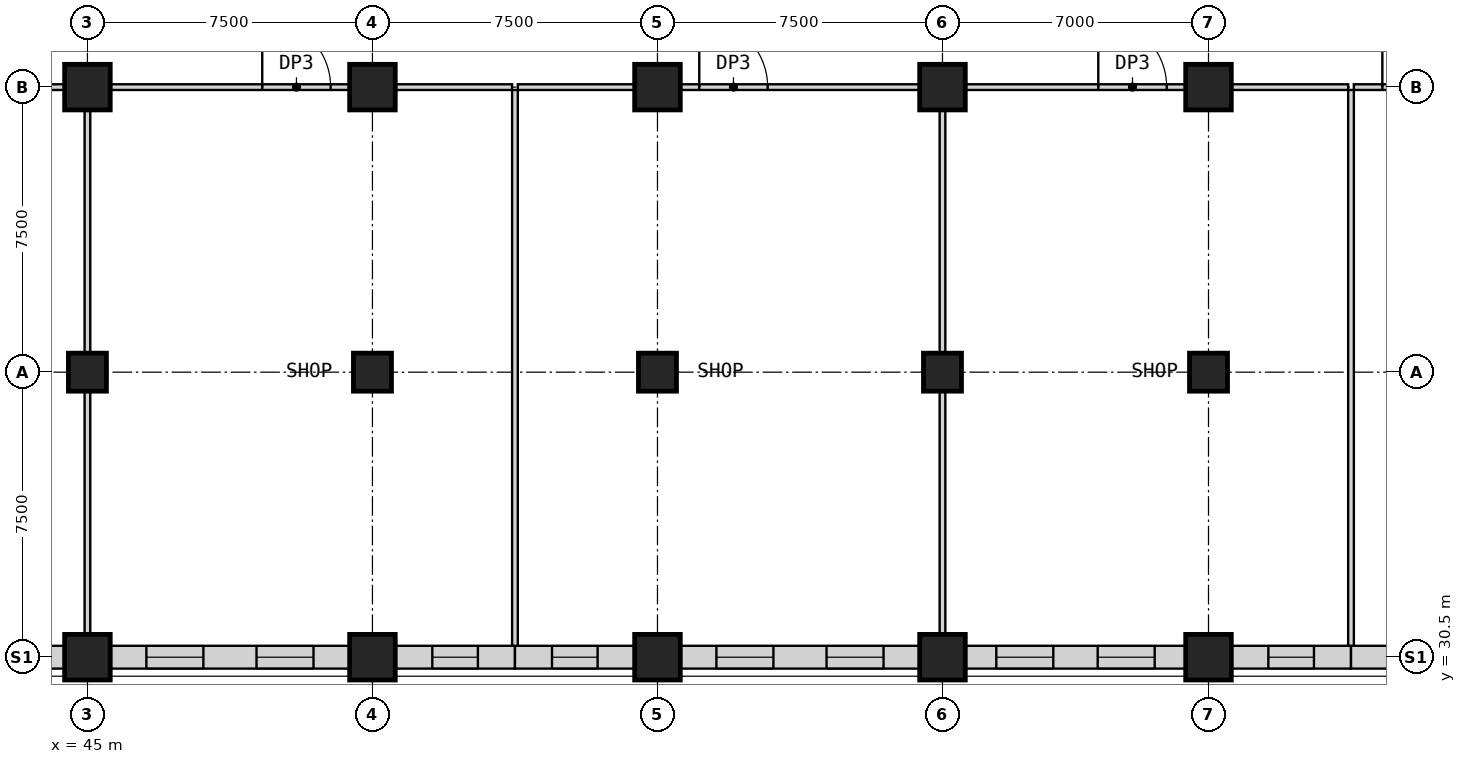
"""IFC4 building model, lengths in metres.
Left out: names, types, materials, properties, quantities, classifications, styles, units other than length and angle.
Written with IfcOpenShell. Run it as: python <this file> out.ifc"""

import sys

from ifc_helpers import new_model, si_unit, direction, frame, frame_2d, origin, origin_2d, place, context, subcontext, project, spatial, rectangle, extrude, element, fill, save


model = new_model("IFC4")
c1 = context("Model", 3, precision=1e-05, world=origin(), true_north=direction((0.0, 1.0)))
c2 = subcontext(c1, "Body", "Model", "MODEL_VIEW")
j1 = project(units=[si_unit("LENGTHUNIT", "METRE"), si_unit("PLANEANGLEUNIT", "RADIAN")], contexts=[c1])
p1 = place(None, origin())
s1 = spatial("IfcSite", under=j1, at=p1, CompositionType="ELEMENT")
p2 = place(p1, origin())
s2 = spatial("IfcBuilding", under=s1, at=p2, CompositionType="ELEMENT")
p3 = place(p2, frame((0.0, 0.0, 13.5)))
s3 = spatial("IfcBuildingStorey", under=s2, at=p3, CompositionType="ELEMENT", Elevation=13.5)
p4 = place(p3, frame((45.0, 38.0, 0.0), z_axis=(0.0, 0.0, 1.0), x_axis=(1.0, 0.0, 0.0)))
e1 = element("IfcColumn", 1, at=p4, inside=s3, PredefinedType="COLUMN", context=c2, shape_type="SweptSolid", body=[
    extrude(rectangle(XDim=1.0, YDim=1.0, at=origin_2d()), origin(), (0.0, 0.0, 1.0), 5.0),
])
p5 = place(p3, frame((45.0, 45.5, 0.0), z_axis=(0.0, 0.0, 1.0), x_axis=(1.0, 0.0, 0.0)))
e2 = element("IfcColumn", 2, at=p5, inside=s3, PredefinedType="COLUMN", context=c2, shape_type="SweptSolid", body=[
    extrude(rectangle(XDim=1.2, YDim=1.2, at=origin_2d()), origin(), (0.0, 0.0, 1.0), 5.0),
])
p6 = place(p3, frame((52.5, 38.0, 0.0), z_axis=(0.0, 0.0, 1.0), x_axis=(1.0, 0.0, 0.0)))
e3 = element("IfcColumn", 3, at=p6, inside=s3, PredefinedType="COLUMN", context=c2, shape_type="SweptSolid", body=[
    extrude(rectangle(XDim=1.0, YDim=1.0, at=origin_2d()), origin(), (0.0, 0.0, 1.0), 5.0),
])
p7 = place(p3, frame((52.5, 45.5, 0.0), z_axis=(0.0, 0.0, 1.0), x_axis=(1.0, 0.0, 0.0)))
e4 = element("IfcColumn", 4, at=p7, inside=s3, PredefinedType="COLUMN", context=c2, shape_type="SweptSolid", body=[
    extrude(rectangle(XDim=1.2, YDim=1.2, at=origin_2d()), origin(), (0.0, 0.0, 1.0), 5.0),
])
p8 = place(p3, frame((60.0, 38.0, 0.0), z_axis=(0.0, 0.0, 1.0), x_axis=(1.0, 0.0, 0.0)))
e5 = element("IfcColumn", 5, at=p8, inside=s3, PredefinedType="COLUMN", context=c2, shape_type="SweptSolid", body=[
    extrude(rectangle(XDim=1.0, YDim=1.0, at=origin_2d()), origin(), (0.0, 0.0, 1.0), 5.0),
])
p9 = place(p3, frame((60.0, 45.5, 0.0), z_axis=(0.0, 0.0, 1.0), x_axis=(1.0, 0.0, 0.0)))
e6 = element("IfcColumn", 6, at=p9, inside=s3, PredefinedType="COLUMN", context=c2, shape_type="SweptSolid", body=[
    extrude(rectangle(XDim=1.2, YDim=1.2, at=origin_2d()), origin(), (0.0, 0.0, 1.0), 5.0),
])
p10 = place(p3, frame((67.5, 38.0, 0.0), z_axis=(0.0, 0.0, 1.0), x_axis=(1.0, 0.0, 0.0)))
e7 = element("IfcColumn", 7, at=p10, inside=s3, PredefinedType="COLUMN", context=c2, shape_type="SweptSolid", body=[
    extrude(rectangle(XDim=1.0, YDim=1.0, at=origin_2d()), origin(), (0.0, 0.0, 1.0), 5.0),
])
p11 = place(p3, frame((67.5, 45.5, 0.0), z_axis=(0.0, 0.0, 1.0), x_axis=(1.0, 0.0, 0.0)))
e8 = element("IfcColumn", 8, at=p11, inside=s3, PredefinedType="COLUMN", context=c2, shape_type="SweptSolid", body=[
    extrude(rectangle(XDim=1.2, YDim=1.2, at=origin_2d()), origin(), (0.0, 0.0, 1.0), 5.0),
])
p12 = place(p3, frame((74.5, 38.0, 0.0), z_axis=(0.0, 0.0, 1.0), x_axis=(1.0, 0.0, 0.0)))
e9 = element("IfcColumn", 9, at=p12, inside=s3, PredefinedType="COLUMN", context=c2, shape_type="SweptSolid", body=[
    extrude(rectangle(XDim=1.0, YDim=1.0, at=origin_2d()), origin(), (0.0, 0.0, 1.0), 5.0),
])
for number, where, z_axis, x_axis in (
    (10, (74.5, 45.5, 0.0), (0.0, 0.0, 1.0), (1.0, 0.0, 0.0)),
    (11, (45.0, 30.5, 0.0), (0.0, 0.0, 1.0), (1.0, 0.0, 0.0)),
    (12, (52.5, 30.5, 0.0), (0.0, 0.0, 1.0), (1.0, 0.0, 0.0)),
    (13, (60.0, 30.5, 0.0), (0.0, 0.0, 1.0), (1.0, 0.0, 0.0)),
    (14, (67.5, 30.5, 0.0), (0.0, 0.0, 1.0), (1.0, 0.0, 0.0)),
    (15, (74.5, 30.5, 0.0), (0.0, 0.0, 1.0), (1.0, 0.0, 0.0)),
):
    element("IfcColumn", number, at=place(p3, frame(where, z_axis=z_axis, x_axis=x_axis)), inside=s3, PredefinedType="COLUMN", context=c2, shape_type="SweptSolid", body=[
        extrude(rectangle(XDim=1.2, YDim=1.2, at=origin_2d()), origin(), (0.0, 0.0, 1.0), 5.0),
    ])
p13 = place(p3, frame((38.1, 30.5, 0.0), z_axis=(0.0, 0.0, 1.0), x_axis=(1.0, 0.0, 0.0)))
e16 = element("IfcWall", 16, at=p13, inside=s3, PredefinedType="PARTITIONING", context=c2, shape_type="SweptSolid", body=[
    extrude(rectangle(XDim=6.3, YDim=0.6, at=frame_2d((3.15, 0.0))), origin(), (0.0, 0.0, 1.0), 4.1),
])
p14 = place(p13, frame((0.951, 0.0, 0.9)))
e17 = element("IfcOpeningElement", 17, at=p14, cuts=e16, PredefinedType="OPENING", context=c2, shape_type="SweptSolid", body=[
    extrude(rectangle(XDim=1.5, YDim=2.8, at=frame_2d((0.75, 1.4))), frame((0.0, 0.31, 0.0), z_axis=(0.0, -1.0, 0.0), x_axis=(1.0, 0.0, 0.0)), (0.0, 0.0, 1.0), 0.62),
])
p15 = place(p13, frame((3.849, 0.0, 0.9)))
e18 = element("IfcOpeningElement", 18, at=p15, cuts=e16, PredefinedType="OPENING", context=c2, shape_type="SweptSolid", body=[
    extrude(rectangle(XDim=1.5, YDim=2.8, at=frame_2d((0.75, 1.4))), frame((0.0, 0.31, 0.0), z_axis=(0.0, -1.0, 0.0), x_axis=(1.0, 0.0, 0.0)), (0.0, 0.0, 1.0), 0.62),
])
p16 = place(p3, frame((45.6, 30.5, 0.0), z_axis=(0.0, 0.0, 1.0), x_axis=(1.0, 0.0, 0.0)))
e19 = element("IfcWall", 19, at=p16, inside=s3, PredefinedType="PARTITIONING", context=c2, shape_type="SweptSolid", body=[
    extrude(rectangle(XDim=6.3, YDim=0.6, at=frame_2d((3.15, 0.0))), origin(), (0.0, 0.0, 1.0), 4.1),
])
p17 = place(p16, frame((0.951, 0.0, 0.9)))
e20 = element("IfcOpeningElement", 20, at=p17, cuts=e19, PredefinedType="OPENING", context=c2, shape_type="SweptSolid", body=[
    extrude(rectangle(XDim=1.5, YDim=2.8, at=frame_2d((0.75, 1.4))), frame((0.0, 0.31, 0.0), z_axis=(0.0, -1.0, 0.0), x_axis=(1.0, 0.0, 0.0)), (0.0, 0.0, 1.0), 0.62),
])
p18 = place(p16, frame((3.849, 0.0, 0.9)))
e21 = element("IfcOpeningElement", 21, at=p18, cuts=e19, PredefinedType="OPENING", context=c2, shape_type="SweptSolid", body=[
    extrude(rectangle(XDim=1.5, YDim=2.8, at=frame_2d((0.75, 1.4))), frame((0.0, 0.31, 0.0), z_axis=(0.0, -1.0, 0.0), x_axis=(1.0, 0.0, 0.0)), (0.0, 0.0, 1.0), 0.62),
])
p19 = place(p3, frame((53.1, 30.5, 0.0), z_axis=(0.0, 0.0, 1.0), x_axis=(1.0, 0.0, 0.0)))
e22 = element("IfcWall", 22, at=p19, inside=s3, PredefinedType="PARTITIONING", context=c2, shape_type="SweptSolid", body=[
    extrude(rectangle(XDim=3.15, YDim=0.6, at=frame_2d((1.575, 0.0))), origin(), (0.0, 0.0, 1.0), 4.1),
])
p20 = place(p19, frame((0.975, 0.0, 0.9)))
e23 = element("IfcOpeningElement", 23, at=p20, cuts=e22, PredefinedType="OPENING", context=c2, shape_type="SweptSolid", body=[
    extrude(rectangle(XDim=1.2, YDim=2.8, at=frame_2d((0.6, 1.4))), frame((0.0, 0.31, 0.0), z_axis=(0.0, -1.0, 0.0), x_axis=(1.0, 0.0, 0.0)), (0.0, 0.0, 1.0), 0.62),
])
p21 = place(p3, frame((56.25, 30.5, 0.0), z_axis=(0.0, 0.0, 1.0), x_axis=(1.0, 0.0, 0.0)))
e24 = element("IfcWall", 24, at=p21, inside=s3, PredefinedType="PARTITIONING", context=c2, shape_type="SweptSolid", body=[
    extrude(rectangle(XDim=3.15, YDim=0.6, at=frame_2d((1.575, 0.0))), origin(), (0.0, 0.0, 1.0), 4.1),
])
p22 = place(p21, frame((0.975, 0.0, 0.9)))
e25 = element("IfcOpeningElement", 25, at=p22, cuts=e24, PredefinedType="OPENING", context=c2, shape_type="SweptSolid", body=[
    extrude(rectangle(XDim=1.2, YDim=2.8, at=frame_2d((0.6, 1.4))), frame((0.0, 0.31, 0.0), z_axis=(0.0, -1.0, 0.0), x_axis=(1.0, 0.0, 0.0)), (0.0, 0.0, 1.0), 0.62),
])
p23 = place(p3, frame((60.6, 30.5, 0.0), z_axis=(0.0, 0.0, 1.0), x_axis=(1.0, 0.0, 0.0)))
e26 = element("IfcWall", 26, at=p23, inside=s3, PredefinedType="PARTITIONING", context=c2, shape_type="SweptSolid", body=[
    extrude(rectangle(XDim=6.3, YDim=0.6, at=frame_2d((3.15, 0.0))), origin(), (0.0, 0.0, 1.0), 4.1),
])
p24 = place(p23, frame((0.951, 0.0, 0.9)))
e27 = element("IfcOpeningElement", 27, at=p24, cuts=e26, PredefinedType="OPENING", context=c2, shape_type="SweptSolid", body=[
    extrude(rectangle(XDim=1.5, YDim=2.8, at=frame_2d((0.75, 1.4))), frame((0.0, 0.31, 0.0), z_axis=(0.0, -1.0, 0.0), x_axis=(1.0, 0.0, 0.0)), (0.0, 0.0, 1.0), 0.62),
])
p25 = place(p23, frame((3.849, 0.0, 0.9)))
e28 = element("IfcOpeningElement", 28, at=p25, cuts=e26, PredefinedType="OPENING", context=c2, shape_type="SweptSolid", body=[
    extrude(rectangle(XDim=1.5, YDim=2.8, at=frame_2d((0.75, 1.4))), frame((0.0, 0.31, 0.0), z_axis=(0.0, -1.0, 0.0), x_axis=(1.0, 0.0, 0.0)), (0.0, 0.0, 1.0), 0.62),
])
p26 = place(p3, frame((68.1, 30.5, 0.0), z_axis=(0.0, 0.0, 1.0), x_axis=(1.0, 0.0, 0.0)))
e29 = element("IfcWall", 29, at=p26, inside=s3, PredefinedType="PARTITIONING", context=c2, shape_type="SweptSolid", body=[
    extrude(rectangle(XDim=5.8, YDim=0.6, at=frame_2d((2.9, 0.0))), origin(), (0.0, 0.0, 1.0), 4.1),
])
p27 = place(p26, frame((0.816, 0.0, 0.9)))
e30 = element("IfcOpeningElement", 30, at=p27, cuts=e29, PredefinedType="OPENING", context=c2, shape_type="SweptSolid", body=[
    extrude(rectangle(XDim=1.5, YDim=2.8, at=frame_2d((0.75, 1.4))), frame((0.0, 0.31, 0.0), z_axis=(0.0, -1.0, 0.0), x_axis=(1.0, 0.0, 0.0)), (0.0, 0.0, 1.0), 0.62),
])
p28 = place(p26, frame((3.484, 0.0, 0.9)))
e31 = element("IfcOpeningElement", 31, at=p28, cuts=e29, PredefinedType="OPENING", context=c2, shape_type="SweptSolid", body=[
    extrude(rectangle(XDim=1.5, YDim=2.8, at=frame_2d((0.75, 1.4))), frame((0.0, 0.31, 0.0), z_axis=(0.0, -1.0, 0.0), x_axis=(1.0, 0.0, 0.0)), (0.0, 0.0, 1.0), 0.62),
])
p29 = place(p3, frame((75.1, 30.5, 0.0), z_axis=(0.0, 0.0, 1.0), x_axis=(1.0, 0.0, 0.0)))
e32 = element("IfcWall", 32, at=p29, inside=s3, PredefinedType="PARTITIONING", context=c2, shape_type="SweptSolid", body=[
    extrude(rectangle(XDim=3.15, YDim=0.6, at=frame_2d((1.575, 0.0))), origin(), (0.0, 0.0, 1.0), 4.1),
])
p30 = place(p29, frame((0.975, 0.0, 0.9)))
e33 = element("IfcOpeningElement", 33, at=p30, cuts=e32, PredefinedType="OPENING", context=c2, shape_type="SweptSolid", body=[
    extrude(rectangle(XDim=1.2, YDim=2.8, at=frame_2d((0.6, 1.4))), frame((0.0, 0.31, 0.0), z_axis=(0.0, -1.0, 0.0), x_axis=(1.0, 0.0, 0.0)), (0.0, 0.0, 1.0), 0.62),
])
p31 = place(p3, frame((78.25, 30.5, 0.0), z_axis=(0.0, 0.0, 1.0), x_axis=(1.0, 0.0, 0.0)))
e34 = element("IfcWall", 34, at=p31, inside=s3, PredefinedType="PARTITIONING", context=c2, shape_type="SweptSolid", body=[
    extrude(rectangle(XDim=3.15, YDim=0.6, at=frame_2d((1.575, 0.0))), origin(), (0.0, 0.0, 1.0), 4.1),
])
p32 = place(p31, frame((0.975, 0.0, 0.9)))
e35 = element("IfcOpeningElement", 35, at=p32, cuts=e34, PredefinedType="OPENING", context=c2, shape_type="SweptSolid", body=[
    extrude(rectangle(XDim=1.2, YDim=2.8, at=frame_2d((0.6, 1.4))), frame((0.0, 0.31, 0.0), z_axis=(0.0, -1.0, 0.0), x_axis=(1.0, 0.0, 0.0)), (0.0, 0.0, 1.0), 0.62),
])
p33 = place(p3, frame((38.1, 45.5, 0.0), z_axis=(0.0, 0.0, 1.0), x_axis=(1.0, 0.0, 0.0)))
e36 = element("IfcWall", 36, at=p33, inside=s3, PredefinedType="PARTITIONING", context=c2, shape_type="SweptSolid", body=[
    extrude(rectangle(XDim=6.3, YDim=0.15, at=frame_2d((3.15, 0.0))), origin(), (0.0, 0.0, 1.0), 4.7),
])
p34 = place(p33, frame((0.5, 0.0, 0.0)))
e37 = element("IfcOpeningElement", 37, at=p34, cuts=e36, PredefinedType="OPENING", context=c2, shape_type="SweptSolid", body=[
    extrude(rectangle(XDim=1.8, YDim=2.4, at=frame_2d((0.9, 1.2))), frame((0.0, 0.085, 0.0), z_axis=(0.0, -1.0, 0.0), x_axis=(1.0, 0.0, 0.0)), (0.0, 0.0, 1.0), 0.17),
])
p35 = place(p3, frame((45.6, 45.5, 0.0), z_axis=(0.0, 0.0, 1.0), x_axis=(1.0, 0.0, 0.0)))
e38 = element("IfcWall", 38, at=p35, inside=s3, PredefinedType="PARTITIONING", context=c2, shape_type="SweptSolid", body=[
    extrude(rectangle(XDim=6.3, YDim=0.15, at=frame_2d((3.15, 0.0))), origin(), (0.0, 0.0, 1.0), 4.7),
])
p36 = place(p35, frame((4.0, 0.0, 0.0)))
e39 = element("IfcOpeningElement", 39, at=p36, cuts=e38, PredefinedType="OPENING", context=c2, shape_type="SweptSolid", body=[
    extrude(rectangle(XDim=1.8, YDim=2.4, at=frame_2d((0.9, 1.2))), frame((0.0, 0.085, 0.0), z_axis=(0.0, -1.0, 0.0), x_axis=(1.0, 0.0, 0.0)), (0.0, 0.0, 1.0), 0.17),
])
for number, where, z_axis, x_axis in (
    (40, (53.1, 45.5, 0.0), (0.0, 0.0, 1.0), (1.0, 0.0, 0.0)),
    (41, (56.325, 45.5, 0.0), (0.0, 0.0, 1.0), (1.0, 0.0, 0.0)),
):
    element("IfcWall", number, at=place(p3, frame(where, z_axis=z_axis, x_axis=x_axis)), inside=s3, PredefinedType="PARTITIONING", context=c2, shape_type="SweptSolid", body=[
        extrude(rectangle(XDim=3.075, YDim=0.15, at=frame_2d((1.538, 0.0))), origin(), (0.0, 0.0, 1.0), 4.7),
    ])
p37 = place(p3, frame((60.6, 45.5, 0.0), z_axis=(0.0, 0.0, 1.0), x_axis=(1.0, 0.0, 0.0)))
e42 = element("IfcWall", 42, at=p37, inside=s3, PredefinedType="PARTITIONING", context=c2, shape_type="SweptSolid", body=[
    extrude(rectangle(XDim=6.3, YDim=0.15, at=frame_2d((3.15, 0.0))), origin(), (0.0, 0.0, 1.0), 4.7),
])
p38 = place(p37, frame((0.5, 0.0, 0.0)))
e43 = element("IfcOpeningElement", 43, at=p38, cuts=e42, PredefinedType="OPENING", context=c2, shape_type="SweptSolid", body=[
    extrude(rectangle(XDim=1.8, YDim=2.4, at=frame_2d((0.9, 1.2))), frame((0.0, 0.085, 0.0), z_axis=(0.0, -1.0, 0.0), x_axis=(1.0, 0.0, 0.0)), (0.0, 0.0, 1.0), 0.17),
])
p39 = place(p3, frame((68.1, 45.5, 0.0), z_axis=(0.0, 0.0, 1.0), x_axis=(1.0, 0.0, 0.0)))
e44 = element("IfcWall", 44, at=p39, inside=s3, PredefinedType="PARTITIONING", context=c2, shape_type="SweptSolid", body=[
    extrude(rectangle(XDim=5.8, YDim=0.15, at=frame_2d((2.9, 0.0))), origin(), (0.0, 0.0, 1.0), 4.7),
])
p40 = place(p39, frame((3.5, 0.0, 0.0)))
e45 = element("IfcOpeningElement", 45, at=p40, cuts=e44, PredefinedType="OPENING", context=c2, shape_type="SweptSolid", body=[
    extrude(rectangle(XDim=1.8, YDim=2.4, at=frame_2d((0.9, 1.2))), frame((0.0, 0.085, 0.0), z_axis=(0.0, -1.0, 0.0), x_axis=(1.0, 0.0, 0.0)), (0.0, 0.0, 1.0), 0.17),
])
p41 = place(p3, frame((75.1, 45.5, 0.0), z_axis=(0.0, 0.0, 1.0), x_axis=(1.0, 0.0, 0.0)))
e46 = element("IfcWall", 46, at=p41, inside=s3, PredefinedType="PARTITIONING", context=c2, shape_type="SweptSolid", body=[
    extrude(rectangle(XDim=3.075, YDim=0.15, at=frame_2d((1.538, 0.0))), origin(), (0.0, 0.0, 1.0), 4.7),
])
p42 = place(p3, frame((78.325, 45.5, 0.0), z_axis=(0.0, 0.0, 1.0), x_axis=(1.0, 0.0, 0.0)))
e47 = element("IfcWall", 47, at=p42, inside=s3, PredefinedType="PARTITIONING", context=c2, shape_type="SweptSolid", body=[
    extrude(rectangle(XDim=3.075, YDim=0.15, at=frame_2d((1.538, 0.0))), origin(), (0.0, 0.0, 1.0), 4.7),
])
p43 = place(p42, frame((0.75, 0.0, 0.0)))
e48 = element("IfcOpeningElement", 48, at=p43, cuts=e47, PredefinedType="OPENING", context=c2, shape_type="SweptSolid", body=[
    extrude(rectangle(XDim=1.8, YDim=2.4, at=frame_2d((0.9, 1.2))), frame((0.0, 0.085, 0.0), z_axis=(0.0, -1.0, 0.0), x_axis=(1.0, 0.0, 0.0)), (0.0, 0.0, 1.0), 0.17),
])
for number, where, z_axis, x_axis in (
    (49, (45.0, 31.1, 0.0), (0.0, 0.0, 1.0), (0.0, 1.0, 0.0)),
    (50, (45.0, 38.5, 0.0), (0.0, 0.0, 1.0), (0.0, 1.0, 0.0)),
):
    element("IfcWall", number, at=place(p3, frame(where, z_axis=z_axis, x_axis=x_axis)), inside=s3, PredefinedType="PARTITIONING", context=c2, shape_type="SweptSolid", body=[
        extrude(rectangle(XDim=6.4, YDim=0.15, at=frame_2d((3.2, 0.0))), origin(), (0.0, 0.0, 1.0), 4.7),
    ])
p44 = place(p3, frame((56.25, 30.8, 0.0), z_axis=(0.0, 0.0, 1.0), x_axis=(0.0, 1.0, 0.0)))
e51 = element("IfcWall", 51, at=p44, inside=s3, PredefinedType="PARTITIONING", context=c2, shape_type="SweptSolid", body=[
    extrude(rectangle(XDim=14.625, YDim=0.15, at=frame_2d((7.312, 0.0))), origin(), (0.0, 0.0, 1.0), 4.7),
])
for number, where, z_axis, x_axis in (
    (52, (67.5, 31.1, 0.0), (0.0, 0.0, 1.0), (0.0, 1.0, 0.0)),
    (53, (67.5, 38.5, 0.0), (0.0, 0.0, 1.0), (0.0, 1.0, 0.0)),
):
    element("IfcWall", number, at=place(p3, frame(where, z_axis=z_axis, x_axis=x_axis)), inside=s3, PredefinedType="PARTITIONING", context=c2, shape_type="SweptSolid", body=[
        extrude(rectangle(XDim=6.4, YDim=0.15, at=frame_2d((3.2, 0.0))), origin(), (0.0, 0.0, 1.0), 4.7),
    ])
p45 = place(p3, frame((78.25, 30.8, 0.0), z_axis=(0.0, 0.0, 1.0), x_axis=(0.0, 1.0, 0.0)))
e54 = element("IfcWall", 54, at=p45, inside=s3, PredefinedType="PARTITIONING", context=c2, shape_type="SweptSolid", body=[
    extrude(rectangle(XDim=14.625, YDim=0.15, at=frame_2d((7.312, 0.0))), origin(), (0.0, 0.0, 1.0), 4.7),
])
p46 = place(p17, origin())
e55 = element("IfcWindow", 55, at=p46, inside=s3, PartitioningType="SINGLE_PANEL", PredefinedType="WINDOW", context=c2, shape_type="SweptSolid", body=[
    extrude(rectangle(XDim=1.5, YDim=2.8, at=frame_2d((0.75, 1.4))), frame((0.0, 0.03, 0.0), z_axis=(0.0, -1.0, 0.0), x_axis=(1.0, 0.0, 0.0)), (0.0, 0.0, 1.0), 0.06),
])
fill(e20, e55)
p47 = place(p18, origin())
e56 = element("IfcWindow", 56, at=p47, inside=s3, PartitioningType="SINGLE_PANEL", PredefinedType="WINDOW", context=c2, shape_type="SweptSolid", body=[
    extrude(rectangle(XDim=1.5, YDim=2.8, at=frame_2d((0.75, 1.4))), frame((0.0, 0.03, 0.0), z_axis=(0.0, -1.0, 0.0), x_axis=(1.0, 0.0, 0.0)), (0.0, 0.0, 1.0), 0.06),
])
fill(e21, e56)
p48 = place(p20, origin())
e57 = element("IfcWindow", 57, at=p48, inside=s3, PartitioningType="SINGLE_PANEL", PredefinedType="WINDOW", context=c2, shape_type="SweptSolid", body=[
    extrude(rectangle(XDim=1.2, YDim=2.8, at=frame_2d((0.6, 1.4))), frame((0.0, 0.03, 0.0), z_axis=(0.0, -1.0, 0.0), x_axis=(1.0, 0.0, 0.0)), (0.0, 0.0, 1.0), 0.06),
])
fill(e23, e57)
p49 = place(p22, origin())
e58 = element("IfcWindow", 58, at=p49, inside=s3, PartitioningType="SINGLE_PANEL", PredefinedType="WINDOW", context=c2, shape_type="SweptSolid", body=[
    extrude(rectangle(XDim=1.2, YDim=2.8, at=frame_2d((0.6, 1.4))), frame((0.0, 0.03, 0.0), z_axis=(0.0, -1.0, 0.0), x_axis=(1.0, 0.0, 0.0)), (0.0, 0.0, 1.0), 0.06),
])
fill(e25, e58)
p50 = place(p24, origin())
e59 = element("IfcWindow", 59, at=p50, inside=s3, PartitioningType="SINGLE_PANEL", PredefinedType="WINDOW", context=c2, shape_type="SweptSolid", body=[
    extrude(rectangle(XDim=1.5, YDim=2.8, at=frame_2d((0.75, 1.4))), frame((0.0, 0.03, 0.0), z_axis=(0.0, -1.0, 0.0), x_axis=(1.0, 0.0, 0.0)), (0.0, 0.0, 1.0), 0.06),
])
fill(e27, e59)
p51 = place(p25, origin())
e60 = element("IfcWindow", 60, at=p51, inside=s3, PartitioningType="SINGLE_PANEL", PredefinedType="WINDOW", context=c2, shape_type="SweptSolid", body=[
    extrude(rectangle(XDim=1.5, YDim=2.8, at=frame_2d((0.75, 1.4))), frame((0.0, 0.03, 0.0), z_axis=(0.0, -1.0, 0.0), x_axis=(1.0, 0.0, 0.0)), (0.0, 0.0, 1.0), 0.06),
])
fill(e28, e60)
p52 = place(p27, origin())
e61 = element("IfcWindow", 61, at=p52, inside=s3, PartitioningType="SINGLE_PANEL", PredefinedType="WINDOW", context=c2, shape_type="SweptSolid", body=[
    extrude(rectangle(XDim=1.5, YDim=2.8, at=frame_2d((0.75, 1.4))), frame((0.0, 0.03, 0.0), z_axis=(0.0, -1.0, 0.0), x_axis=(1.0, 0.0, 0.0)), (0.0, 0.0, 1.0), 0.06),
])
fill(e30, e61)
p53 = place(p28, origin())
e62 = element("IfcWindow", 62, at=p53, inside=s3, PartitioningType="SINGLE_PANEL", PredefinedType="WINDOW", context=c2, shape_type="SweptSolid", body=[
    extrude(rectangle(XDim=1.5, YDim=2.8, at=frame_2d((0.75, 1.4))), frame((0.0, 0.03, 0.0), z_axis=(0.0, -1.0, 0.0), x_axis=(1.0, 0.0, 0.0)), (0.0, 0.0, 1.0), 0.06),
])
fill(e31, e62)
p54 = place(p30, origin())
e63 = element("IfcWindow", 63, at=p54, inside=s3, PartitioningType="SINGLE_PANEL", PredefinedType="WINDOW", context=c2, shape_type="SweptSolid", body=[
    extrude(rectangle(XDim=1.2, YDim=2.8, at=frame_2d((0.6, 1.4))), frame((0.0, 0.03, 0.0), z_axis=(0.0, -1.0, 0.0), x_axis=(1.0, 0.0, 0.0)), (0.0, 0.0, 1.0), 0.06),
])
fill(e33, e63)
p55 = place(p36, origin())
e64 = element("IfcDoor", 64, at=p55, inside=s3, OperationType="SINGLE_SWING_LEFT", PredefinedType="DOOR", context=c2, shape_type="SweptSolid", body=[
    extrude(rectangle(XDim=1.8, YDim=2.4, at=frame_2d((0.9, 1.2))), frame((0.0, 0.025, 0.0), z_axis=(0.0, -1.0, 0.0), x_axis=(1.0, 0.0, 0.0)), (0.0, 0.0, 1.0), 0.05),
])
fill(e39, e64)
p56 = place(p38, origin())
e65 = element("IfcDoor", 65, at=p56, inside=s3, OperationType="SINGLE_SWING_LEFT", PredefinedType="DOOR", context=c2, shape_type="SweptSolid", body=[
    extrude(rectangle(XDim=1.8, YDim=2.4, at=frame_2d((0.9, 1.2))), frame((0.0, 0.025, 0.0), z_axis=(0.0, -1.0, 0.0), x_axis=(1.0, 0.0, 0.0)), (0.0, 0.0, 1.0), 0.05),
])
fill(e43, e65)
p57 = place(p40, origin())
e66 = element("IfcDoor", 66, at=p57, inside=s3, OperationType="SINGLE_SWING_LEFT", PredefinedType="DOOR", context=c2, shape_type="SweptSolid", body=[
    extrude(rectangle(XDim=1.8, YDim=2.4, at=frame_2d((0.9, 1.2))), frame((0.0, 0.025, 0.0), z_axis=(0.0, -1.0, 0.0), x_axis=(1.0, 0.0, 0.0)), (0.0, 0.0, 1.0), 0.05),
])
fill(e45, e66)
p58 = place(p43, origin())
e67 = element("IfcDoor", 67, at=p58, inside=s3, OperationType="SINGLE_SWING_LEFT", PredefinedType="DOOR", context=c2, shape_type="SweptSolid", body=[
    extrude(rectangle(XDim=1.8, YDim=2.4, at=frame_2d((0.9, 1.2))), frame((0.0, 0.025, 0.0), z_axis=(0.0, -1.0, 0.0), x_axis=(1.0, 0.0, 0.0)), (0.0, 0.0, 1.0), 0.05),
])
fill(e48, e67)
save(model, sys.argv[1])
